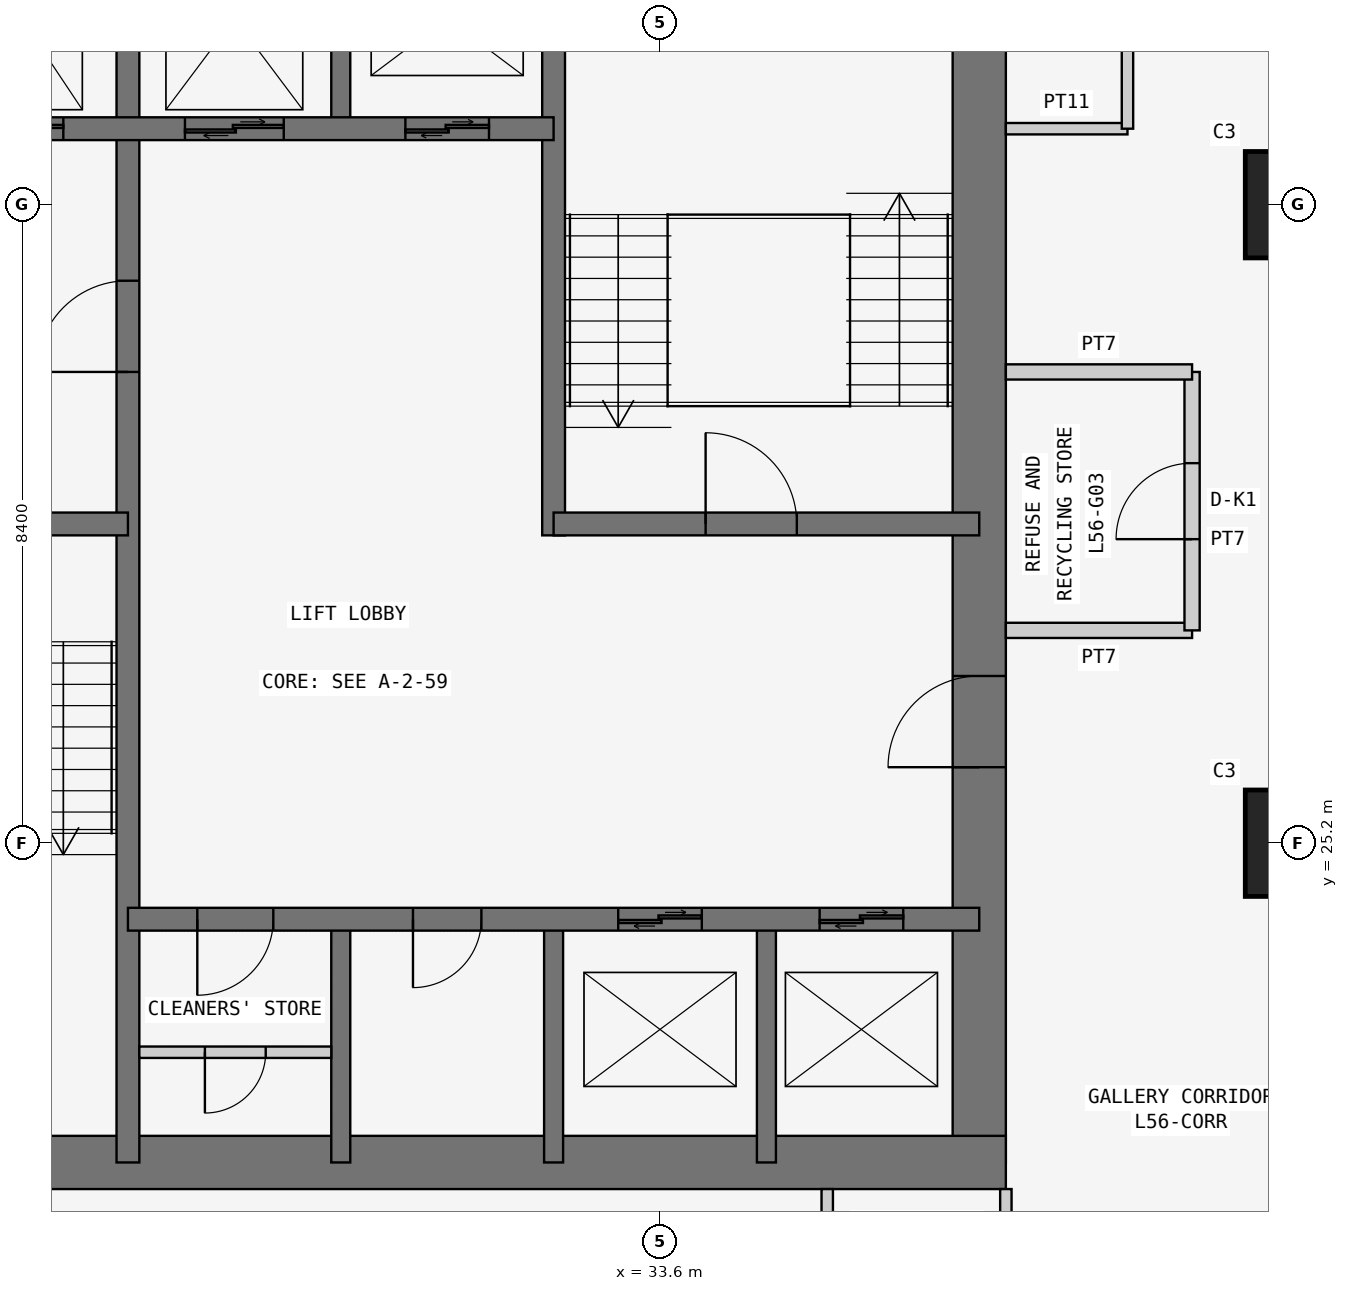
"""IFC4 building model, lengths in metres.
Left out: names, types, materials, properties, quantities, classifications, styles, units other than length and angle.
Written with IfcOpenShell. Run it as: python <this file> out.ifc"""

import sys

from ifc_helpers import new_model, si_unit, direction, frame, frame_2d, origin, origin_2d, place, context, subcontext, project, spatial, rectangle, extrude, element, fill, save


model = new_model("IFC4")
c1 = context("Model", 3, precision=1e-05, world=origin(), true_north=direction((0.0, 1.0)))
c2 = subcontext(c1, "Body", "Model", "MODEL_VIEW")
j1 = project(units=[si_unit("LENGTHUNIT", "METRE"), si_unit("PLANEANGLEUNIT", "RADIAN")], contexts=[c1])
p1 = place(None, origin())
s1 = spatial("IfcSite", under=j1, at=p1, CompositionType="ELEMENT")
p2 = place(p1, origin())
s2 = spatial("IfcBuilding", under=s1, at=p2, CompositionType="ELEMENT")
p3 = place(p2, frame((0.0, 0.0, 215.7)))
s3 = spatial("IfcBuildingStorey", under=s2, at=p3, CompositionType="ELEMENT", Elevation=215.7)
for number, where, z_axis, x_axis in (
    (1, (42.0, 25.2, 0.0), (0.0, 0.0, 1.0), (1.0, 0.0, 0.0)),
    (2, (42.0, 33.6, 0.0), (0.0, 0.0, 1.0), (1.0, 0.0, 0.0)),
):
    element("IfcColumn", number, at=place(p3, frame(where, z_axis=z_axis, x_axis=x_axis)), inside=s3, PredefinedType="COLUMN", context=c2, shape_type="SweptSolid", body=[
        extrude(rectangle(XDim=1.4, YDim=1.4, at=origin_2d()), origin(), (0.0, 0.0, 1.0), 3.6),
    ])
p4 = place(p3, frame((21.0, 21.0, 0.0), z_axis=(0.0, 0.0, 1.0), x_axis=(1.0, 0.0, 0.0)))
e3 = element("IfcWall", 3, at=p4, inside=s3, PredefinedType="SHEAR", context=c2, shape_type="SweptSolid", body=[
    extrude(rectangle(XDim=17.15, YDim=0.7, at=frame_2d((8.575, 0.0))), origin(), (0.0, 0.0, 1.0), 3.6),
])
p5 = place(p3, frame((37.8, 21.0, 0.0), z_axis=(0.0, 0.0, 1.0), x_axis=(0.0, 1.0, 0.0)))
e4 = element("IfcWall", 4, at=p5, inside=s3, PredefinedType="SHEAR", context=c2, shape_type="SweptSolid", body=[
    extrude(rectangle(XDim=17.15, YDim=0.7, at=frame_2d((8.575, 0.0))), origin(), (0.0, 0.0, 1.0), 3.6),
])
p6 = place(p5, frame((5.2, 0.0, 0.0)))
e5 = element("IfcOpeningElement", 5, at=p6, cuts=e4, PredefinedType="OPENING", context=c2, shape_type="SweptSolid", body=[
    extrude(rectangle(XDim=1.2, YDim=2.1, at=frame_2d((0.6, 1.05))), frame((0.0, 0.36, 0.0), z_axis=(0.0, -1.0, 0.0), x_axis=(1.0, 0.0, 0.0)), (0.0, 0.0, 1.0), 0.72),
])
p7 = place(p3, frame((26.6, 21.0, 0.0), z_axis=(0.0, 0.0, 1.0), x_axis=(0.0, 1.0, 0.0)))
e6 = element("IfcWall", 6, at=p7, inside=s3, PredefinedType="SHEAR", context=c2, shape_type="SweptSolid", body=[
    extrude(rectangle(XDim=16.8, YDim=0.3, at=frame_2d((8.4, 0.0))), origin(), (0.0, 0.0, 1.0), 3.6),
])
p8 = place(p7, frame((10.4, 0.0, 0.0)))
e7 = element("IfcOpeningElement", 7, at=p8, cuts=e6, PredefinedType="OPENING", context=c2, shape_type="SweptSolid", body=[
    extrude(rectangle(XDim=1.2, YDim=2.1, at=frame_2d((0.6, 1.05))), frame((0.0, 0.16, 0.0), z_axis=(0.0, -1.0, 0.0), x_axis=(1.0, 0.0, 0.0)), (0.0, 0.0, 1.0), 0.32),
])
p9 = place(p3, frame((21.0, 29.4, 0.0), z_axis=(0.0, 0.0, 1.0), x_axis=(1.0, 0.0, 0.0)))
e8 = element("IfcWall", 8, at=p9, inside=s3, PredefinedType="SHEAR", context=c2, shape_type="SweptSolid", body=[
    extrude(rectangle(XDim=5.6, YDim=0.3, at=frame_2d((2.8, 0.0))), origin(), (0.0, 0.0, 1.0), 3.6),
])
p10 = place(p9, frame((2.3, 0.0, 0.0)))
e9 = element("IfcOpeningElement", 9, at=p10, cuts=e8, PredefinedType="OPENING", context=c2, shape_type="SweptSolid", body=[
    extrude(rectangle(XDim=1.2, YDim=2.1, at=frame_2d((0.6, 1.05))), frame((0.0, 0.16, 0.0), z_axis=(0.0, -1.0, 0.0), x_axis=(1.0, 0.0, 0.0)), (0.0, 0.0, 1.0), 0.32),
])
p11 = place(p3, frame((21.0, 34.6, 0.0), z_axis=(0.0, 0.0, 1.0), x_axis=(1.0, 0.0, 0.0)))
e10 = element("IfcWall", 10, at=p11, inside=s3, PredefinedType="SHEAR", context=c2, shape_type="SweptSolid", body=[
    extrude(rectangle(XDim=11.2, YDim=0.3, at=frame_2d((5.6, 0.0))), origin(), (0.0, 0.0, 1.0), 3.6),
])
p12 = place(p11, frame((9.25, 0.0, 0.0)))
e11 = element("IfcOpeningElement", 11, at=p12, cuts=e10, PredefinedType="OPENING", context=c2, shape_type="SweptSolid", body=[
    extrude(rectangle(XDim=1.1, YDim=2.1, at=frame_2d((0.55, 1.05))), frame((0.0, 0.16, 0.0), z_axis=(0.0, -1.0, 0.0), x_axis=(1.0, 0.0, 0.0)), (0.0, 0.0, 1.0), 0.32),
])
p13 = place(p11, frame((1.0, 0.0, 0.0)))
e12 = element("IfcOpeningElement", 12, at=p13, cuts=e10, PredefinedType="OPENING", context=c2, shape_type="SweptSolid", body=[
    extrude(rectangle(XDim=1.1, YDim=2.1, at=frame_2d((0.55, 1.05))), frame((0.0, 0.16, 0.0), z_axis=(0.0, -1.0, 0.0), x_axis=(1.0, 0.0, 0.0)), (0.0, 0.0, 1.0), 0.32),
])
p14 = place(p11, frame((3.65, 0.0, 0.0)))
e13 = element("IfcOpeningElement", 13, at=p14, cuts=e10, PredefinedType="OPENING", context=c2, shape_type="SweptSolid", body=[
    extrude(rectangle(XDim=1.1, YDim=2.1, at=frame_2d((0.55, 1.05))), frame((0.0, 0.16, 0.0), z_axis=(0.0, -1.0, 0.0), x_axis=(1.0, 0.0, 0.0)), (0.0, 0.0, 1.0), 0.32),
])
p15 = place(p11, frame((6.35, 0.0, 0.0)))
e14 = element("IfcOpeningElement", 14, at=p15, cuts=e10, PredefinedType="OPENING", context=c2, shape_type="SweptSolid", body=[
    extrude(rectangle(XDim=1.3, YDim=2.1, at=frame_2d((0.65, 1.05))), frame((0.0, 0.16, 0.0), z_axis=(0.0, -1.0, 0.0), x_axis=(1.0, 0.0, 0.0)), (0.0, 0.0, 1.0), 0.32),
])
p16 = place(p3, frame((26.6, 24.2, 0.0), z_axis=(0.0, 0.0, 1.0), x_axis=(1.0, 0.0, 0.0)))
e15 = element("IfcWall", 15, at=p16, inside=s3, PredefinedType="SHEAR", context=c2, shape_type="SweptSolid", body=[
    extrude(rectangle(XDim=11.2, YDim=0.3, at=frame_2d((5.6, 0.0))), origin(), (0.0, 0.0, 1.0), 3.6),
])
p17 = place(p16, frame((0.913, 0.0, 0.0)))
e16 = element("IfcOpeningElement", 16, at=p17, cuts=e15, PredefinedType="OPENING", context=c2, shape_type="SweptSolid", body=[
    extrude(rectangle(XDim=1.0, YDim=2.1, at=frame_2d((0.5, 1.05))), frame((0.0, 0.16, 0.0), z_axis=(0.0, -1.0, 0.0), x_axis=(1.0, 0.0, 0.0)), (0.0, 0.0, 1.0), 0.32),
])
p18 = place(p16, frame((3.75, 0.0, 0.0)))
e17 = element("IfcOpeningElement", 17, at=p18, cuts=e15, PredefinedType="OPENING", context=c2, shape_type="SweptSolid", body=[
    extrude(rectangle(XDim=0.9, YDim=2.1, at=frame_2d((0.45, 1.05))), frame((0.0, 0.16, 0.0), z_axis=(0.0, -1.0, 0.0), x_axis=(1.0, 0.0, 0.0)), (0.0, 0.0, 1.0), 0.32),
])
p19 = place(p16, frame((6.45, 0.0, 0.0)))
e18 = element("IfcOpeningElement", 18, at=p19, cuts=e15, PredefinedType="OPENING", context=c2, shape_type="SweptSolid", body=[
    extrude(rectangle(XDim=1.1, YDim=2.1, at=frame_2d((0.55, 1.05))), frame((0.0, 0.16, 0.0), z_axis=(0.0, -1.0, 0.0), x_axis=(1.0, 0.0, 0.0)), (0.0, 0.0, 1.0), 0.32),
])
p20 = place(p16, frame((9.1, 0.0, 0.0)))
e19 = element("IfcOpeningElement", 19, at=p20, cuts=e15, PredefinedType="OPENING", context=c2, shape_type="SweptSolid", body=[
    extrude(rectangle(XDim=1.1, YDim=2.1, at=frame_2d((0.55, 1.05))), frame((0.0, 0.16, 0.0), z_axis=(0.0, -1.0, 0.0), x_axis=(1.0, 0.0, 0.0)), (0.0, 0.0, 1.0), 0.32),
])
p21 = place(p3, frame((32.2, 29.25, 0.0), z_axis=(0.0, 0.0, 1.0), x_axis=(0.0, 1.0, 0.0)))
e20 = element("IfcWall", 20, at=p21, inside=s3, PredefinedType="SHEAR", context=c2, shape_type="SweptSolid", body=[
    extrude(rectangle(XDim=8.55, YDim=0.3, at=frame_2d((4.275, 0.0))), origin(), (0.0, 0.0, 1.0), 3.6),
])
p22 = place(p3, frame((32.2, 29.4, 0.0), z_axis=(0.0, 0.0, 1.0), x_axis=(1.0, 0.0, 0.0)))
e21 = element("IfcWall", 21, at=p22, inside=s3, PredefinedType="SHEAR", context=c2, shape_type="SweptSolid", body=[
    extrude(rectangle(XDim=5.6, YDim=0.3, at=frame_2d((2.8, 0.0))), origin(), (0.0, 0.0, 1.0), 3.6),
])
p23 = place(p22, frame((2.0, 0.0, 0.0)))
e22 = element("IfcOpeningElement", 22, at=p23, cuts=e21, PredefinedType="OPENING", context=c2, shape_type="SweptSolid", body=[
    extrude(rectangle(XDim=1.2, YDim=2.1, at=frame_2d((0.6, 1.05))), frame((0.0, 0.16, 0.0), z_axis=(0.0, -1.0, 0.0), x_axis=(1.0, 0.0, 0.0)), (0.0, 0.0, 1.0), 0.32),
])
for number, where, z_axis, x_axis in (
    (23, (29.4, 21.0, 0.0), (0.0, 0.0, 1.0), (0.0, 1.0, 0.0)),
    (24, (32.2, 21.0, 0.0), (0.0, 0.0, 1.0), (0.0, 1.0, 0.0)),
    (25, (35.0, 21.0, 0.0), (0.0, 0.0, 1.0), (0.0, 1.0, 0.0)),
    (26, (29.4, 34.6, 0.0), (0.0, 0.0, 1.0), (0.0, 1.0, 0.0)),
):
    element("IfcWall", number, at=place(p3, frame(where, z_axis=z_axis, x_axis=x_axis)), inside=s3, PredefinedType="SHEAR", context=c2, shape_type="SweptSolid", body=[
        extrude(rectangle(XDim=3.2, YDim=0.25, at=frame_2d((1.6, 0.0))), origin(), (0.0, 0.0, 1.0), 3.6),
    ])
p24 = place(p3, frame((38.15, 28.0, 0.0), z_axis=(0.0, 0.0, 1.0), x_axis=(1.0, 0.0, 0.0)))
e27 = element("IfcWall", 27, at=p24, inside=s3, PredefinedType="PARTITIONING", context=c2, shape_type="SweptSolid", body=[
    extrude(rectangle(XDim=2.45, YDim=0.2, at=frame_2d((1.225, 0.0))), origin(), (0.0, 0.0, 1.0), 3.45),
])
p25 = place(p3, frame((40.6, 28.0, 0.0), z_axis=(0.0, 0.0, 1.0), x_axis=(0.0, 1.0, 0.0)))
e28 = element("IfcWall", 28, at=p25, inside=s3, PredefinedType="PARTITIONING", context=c2, shape_type="SweptSolid", body=[
    extrude(rectangle(XDim=3.4, YDim=0.2, at=frame_2d((1.7, 0.0))), origin(), (0.0, 0.0, 1.0), 3.45),
])
p26 = place(p25, frame((1.2, 0.0, 0.0)))
e29 = element("IfcOpeningElement", 29, at=p26, cuts=e28, PredefinedType="OPENING", context=c2, shape_type="SweptSolid", body=[
    extrude(rectangle(XDim=1.0, YDim=2.1, at=frame_2d((0.5, 1.05))), frame((0.0, 0.11, 0.0), z_axis=(0.0, -1.0, 0.0), x_axis=(1.0, 0.0, 0.0)), (0.0, 0.0, 1.0), 0.22),
])
p27 = place(p3, frame((40.6, 31.4, 0.0), z_axis=(0.0, 0.0, 1.0), x_axis=(-1.0, 0.0, 0.0)))
e30 = element("IfcWall", 30, at=p27, inside=s3, PredefinedType="PARTITIONING", context=c2, shape_type="SweptSolid", body=[
    extrude(rectangle(XDim=2.45, YDim=0.2, at=frame_2d((1.225, 0.0))), origin(), (0.0, 0.0, 1.0), 3.45),
])
p28 = place(p3, frame((38.15, 34.6, 0.0), z_axis=(0.0, 0.0, 1.0), x_axis=(1.0, 0.0, 0.0)))
e31 = element("IfcWall", 31, at=p28, inside=s3, PredefinedType="PARTITIONING", context=c2, shape_type="SweptSolid", body=[
    extrude(rectangle(XDim=1.6, YDim=0.15, at=frame_2d((0.8, 0.0))), origin(), (0.0, 0.0, 1.0), 3.45),
])
p29 = place(p3, frame((39.75, 34.6, 0.0), z_axis=(0.0, 0.0, 1.0), x_axis=(0.0, 1.0, 0.0)))
e32 = element("IfcWall", 32, at=p29, inside=s3, PredefinedType="PARTITIONING", context=c2, shape_type="SweptSolid", body=[
    extrude(rectangle(XDim=3.55, YDim=0.15, at=frame_2d((1.775, 0.0))), origin(), (0.0, 0.0, 1.0), 3.45),
])
p30 = place(p29, frame((1.275, 0.0, 0.0)))
e33 = element("IfcOpeningElement", 33, at=p30, cuts=e32, PredefinedType="OPENING", context=c2, shape_type="SweptSolid", body=[
    extrude(rectangle(XDim=1.0, YDim=2.1, at=frame_2d((0.5, 1.05))), frame((0.0, 0.085, 0.0), z_axis=(0.0, -1.0, 0.0), x_axis=(1.0, 0.0, 0.0)), (0.0, 0.0, 1.0), 0.17),
])
for number, where, z_axis, x_axis in (
    (34, (35.8, 20.65, 0.0), (0.0, 0.0, 1.0), (0.0, -1.0, 0.0)),
    (35, (38.15, 18.2, 0.0), (0.0, 0.0, 1.0), (0.0, 1.0, 0.0)),
):
    element("IfcWall", number, at=place(p3, frame(where, z_axis=z_axis, x_axis=x_axis)), inside=s3, PredefinedType="PARTITIONING", context=c2, shape_type="SweptSolid", body=[
        extrude(rectangle(XDim=2.45, YDim=0.15, at=frame_2d((1.225, 0.0))), origin(), (0.0, 0.0, 1.0), 3.45),
    ])
p31 = place(p3, frame((26.75, 22.45, 0.0), z_axis=(0.0, 0.0, 1.0), x_axis=(1.0, 0.0, 0.0)))
e36 = element("IfcWall", 36, at=p31, inside=s3, PredefinedType="PARTITIONING", context=c2, shape_type="SweptSolid", body=[
    extrude(rectangle(XDim=2.525, YDim=0.15, at=frame_2d((1.262, 0.0))), origin(), (0.0, 0.0, 1.0), 3.45),
])
p32 = place(p31, frame((0.863, 0.0, 0.0)))
e37 = element("IfcOpeningElement", 37, at=p32, cuts=e36, PredefinedType="OPENING", context=c2, shape_type="SweptSolid", body=[
    extrude(rectangle(XDim=0.8, YDim=2.1, at=frame_2d((0.4, 1.05))), frame((0.0, 0.085, 0.0), z_axis=(0.0, -1.0, 0.0), x_axis=(1.0, 0.0, 0.0)), (0.0, 0.0, 1.0), 0.17),
])
p33 = place(p26, origin())
e38 = element("IfcDoor", 38, at=p33, inside=s3, OperationType="SINGLE_SWING_LEFT", PredefinedType="DOOR", context=c2, shape_type="SweptSolid", body=[
    extrude(rectangle(XDim=1.0, YDim=2.1, at=frame_2d((0.5, 1.05))), frame((0.0, 0.025, 0.0), z_axis=(0.0, -1.0, 0.0), x_axis=(1.0, 0.0, 0.0)), (0.0, 0.0, 1.0), 0.05),
])
fill(e29, e38)
p34 = place(p8, origin())
e39 = element("IfcDoor", 39, at=p34, inside=s3, OperationType="SINGLE_SWING_LEFT", PredefinedType="DOOR", context=c2, shape_type="SweptSolid", body=[
    extrude(rectangle(XDim=1.2, YDim=2.1, at=frame_2d((0.6, 1.05))), frame((0.0, 0.025, 0.0), z_axis=(0.0, -1.0, 0.0), x_axis=(1.0, 0.0, 0.0)), (0.0, 0.0, 1.0), 0.05),
])
fill(e7, e39)
p35 = place(p6, origin())
e40 = element("IfcDoor", 40, at=p35, inside=s3, OperationType="SINGLE_SWING_LEFT", PredefinedType="DOOR", context=c2, shape_type="SweptSolid", body=[
    extrude(rectangle(XDim=1.2, YDim=2.1, at=frame_2d((0.6, 1.05))), frame((0.0, 0.025, 0.0), z_axis=(0.0, -1.0, 0.0), x_axis=(1.0, 0.0, 0.0)), (0.0, 0.0, 1.0), 0.05),
])
fill(e5, e40)
p36 = place(p23, origin())
e41 = element("IfcDoor", 41, at=p36, inside=s3, OperationType="SINGLE_SWING_LEFT", PredefinedType="DOOR", context=c2, shape_type="SweptSolid", body=[
    extrude(rectangle(XDim=1.2, YDim=2.1, at=frame_2d((0.6, 1.05))), frame((0.0, 0.025, 0.0), z_axis=(0.0, -1.0, 0.0), x_axis=(1.0, 0.0, 0.0)), (0.0, 0.0, 1.0), 0.05),
])
fill(e22, e41)
p37 = place(p17, frame((1.0, 0.0, 0.0), z_axis=(0.0, 0.0, 1.0), x_axis=(-1.0, 0.0, 0.0)))
e42 = element("IfcDoor", 42, at=p37, inside=s3, OperationType="SINGLE_SWING_RIGHT", PredefinedType="DOOR", context=c2, shape_type="SweptSolid", body=[
    extrude(rectangle(XDim=1.0, YDim=2.1, at=frame_2d((0.5, 1.05))), frame((0.0, 0.025, 0.0), z_axis=(0.0, -1.0, 0.0), x_axis=(1.0, 0.0, 0.0)), (0.0, 0.0, 1.0), 0.05),
])
fill(e16, e42)
p38 = place(p32, frame((0.8, 0.0, 0.0), z_axis=(0.0, 0.0, 1.0), x_axis=(-1.0, 0.0, 0.0)))
e43 = element("IfcDoor", 43, at=p38, inside=s3, OperationType="SINGLE_SWING_RIGHT", PredefinedType="DOOR", context=c2, shape_type="SweptSolid", body=[
    extrude(rectangle(XDim=0.8, YDim=2.1, at=frame_2d((0.4, 1.05))), frame((0.0, 0.025, 0.0), z_axis=(0.0, -1.0, 0.0), x_axis=(1.0, 0.0, 0.0)), (0.0, 0.0, 1.0), 0.05),
])
fill(e37, e43)
p39 = place(p18, frame((0.9, 0.0, 0.0), z_axis=(0.0, 0.0, 1.0), x_axis=(-1.0, 0.0, 0.0)))
e44 = element("IfcDoor", 44, at=p39, inside=s3, OperationType="SINGLE_SWING_RIGHT", PredefinedType="DOOR", context=c2, shape_type="SweptSolid", body=[
    extrude(rectangle(XDim=0.9, YDim=2.1, at=frame_2d((0.45, 1.05))), frame((0.0, 0.025, 0.0), z_axis=(0.0, -1.0, 0.0), x_axis=(1.0, 0.0, 0.0)), (0.0, 0.0, 1.0), 0.05),
])
fill(e17, e44)
p40 = place(p19, origin())
e45 = element("IfcDoor", 45, at=p40, inside=s3, OperationType="DOUBLE_DOOR_SLIDING", PredefinedType="DOOR", context=c2, shape_type="SweptSolid", body=[
    extrude(rectangle(XDim=1.1, YDim=2.1, at=frame_2d((0.55, 1.05))), frame((0.0, 0.025, 0.0), z_axis=(0.0, -1.0, 0.0), x_axis=(1.0, 0.0, 0.0)), (0.0, 0.0, 1.0), 0.05),
])
fill(e18, e45)
p41 = place(p20, origin())
e46 = element("IfcDoor", 46, at=p41, inside=s3, OperationType="DOUBLE_DOOR_SLIDING", PredefinedType="DOOR", context=c2, shape_type="SweptSolid", body=[
    extrude(rectangle(XDim=1.1, YDim=2.1, at=frame_2d((0.55, 1.05))), frame((0.0, 0.025, 0.0), z_axis=(0.0, -1.0, 0.0), x_axis=(1.0, 0.0, 0.0)), (0.0, 0.0, 1.0), 0.05),
])
fill(e19, e46)
p42 = place(p12, origin())
e47 = element("IfcDoor", 47, at=p42, inside=s3, OperationType="DOUBLE_DOOR_SLIDING", PredefinedType="DOOR", context=c2, shape_type="SweptSolid", body=[
    extrude(rectangle(XDim=1.1, YDim=2.1, at=frame_2d((0.55, 1.05))), frame((0.0, 0.025, 0.0), z_axis=(0.0, -1.0, 0.0), x_axis=(1.0, 0.0, 0.0)), (0.0, 0.0, 1.0), 0.05),
])
fill(e11, e47)
p43 = place(p14, origin())
e48 = element("IfcDoor", 48, at=p43, inside=s3, OperationType="DOUBLE_DOOR_SLIDING", PredefinedType="DOOR", context=c2, shape_type="SweptSolid", body=[
    extrude(rectangle(XDim=1.1, YDim=2.1, at=frame_2d((0.55, 1.05))), frame((0.0, 0.025, 0.0), z_axis=(0.0, -1.0, 0.0), x_axis=(1.0, 0.0, 0.0)), (0.0, 0.0, 1.0), 0.05),
])
fill(e13, e48)
p44 = place(p15, origin())
e49 = element("IfcDoor", 49, at=p44, inside=s3, OperationType="DOUBLE_DOOR_SLIDING", PredefinedType="DOOR", context=c2, shape_type="SweptSolid", body=[
    extrude(rectangle(XDim=1.3, YDim=2.1, at=frame_2d((0.65, 1.05))), frame((0.0, 0.025, 0.0), z_axis=(0.0, -1.0, 0.0), x_axis=(1.0, 0.0, 0.0)), (0.0, 0.0, 1.0), 0.05),
])
fill(e14, e49)
save(model, sys.argv[1])
